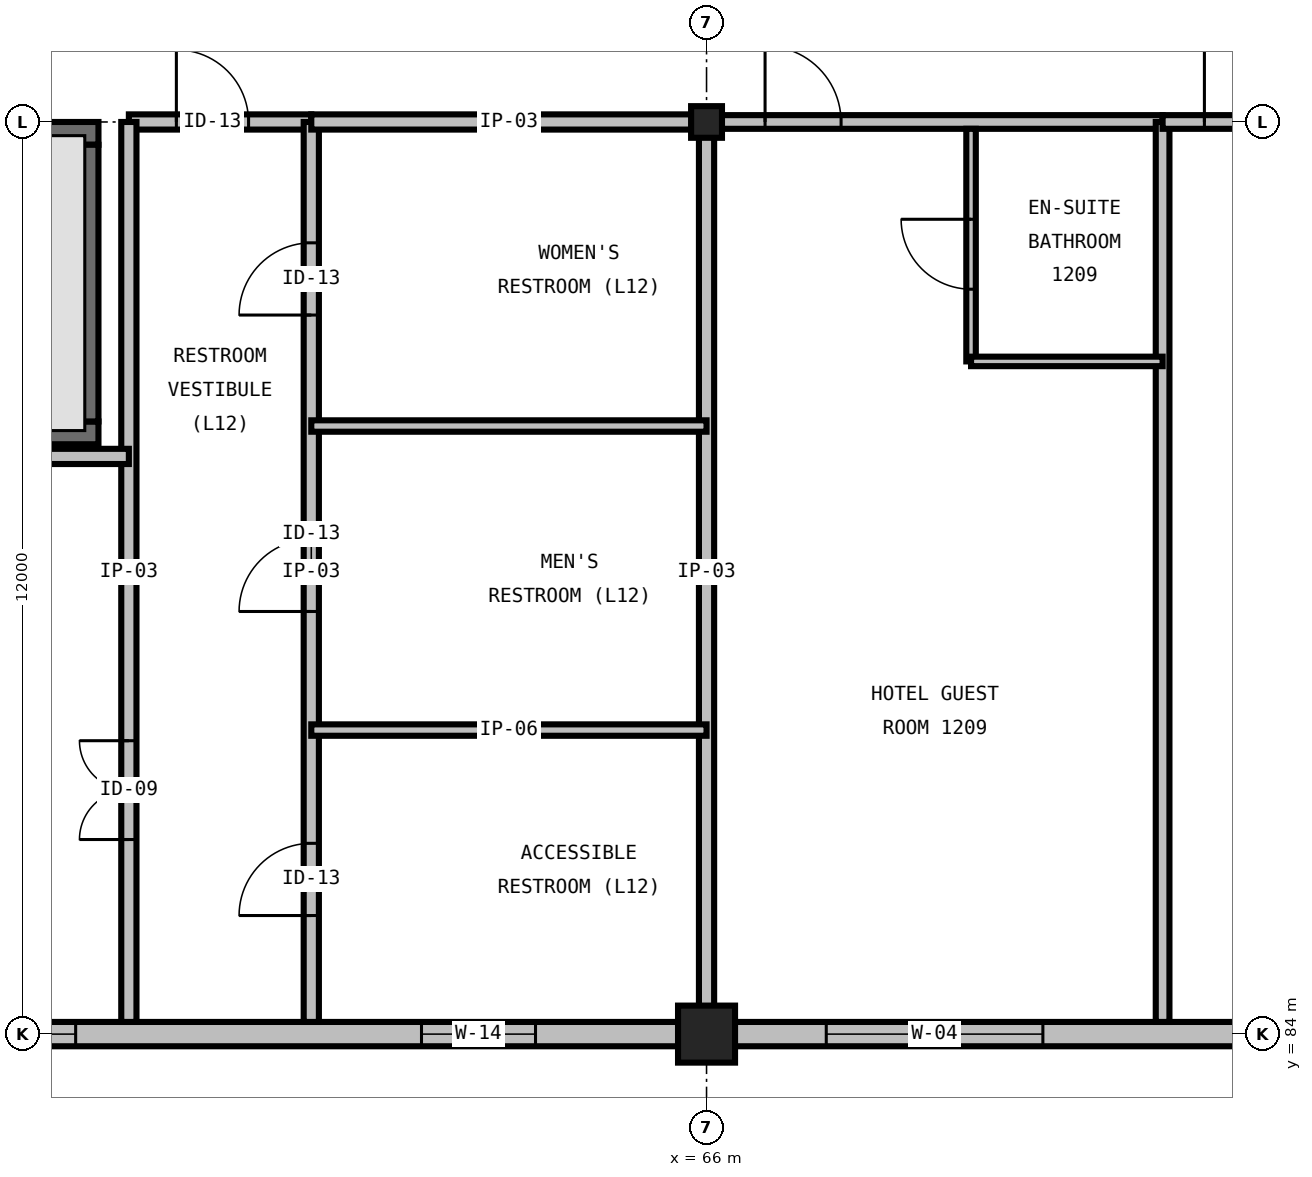
"""IFC4 building model, lengths in metres.
Left out: names, types, materials, properties, quantities, classifications, styles, units other than length and angle.
Written with IfcOpenShell. Run it as: python <this file> out.ifc"""

import sys

from ifc_helpers import new_model, si_unit, direction, frame, frame_2d, origin, origin_2d, place, context, subcontext, project, spatial, rectangle, i_section, extrude, element, fill, save


model = new_model("IFC4")
c1 = context("Model", 3, precision=1e-05, world=origin(), true_north=direction((0.0, 1.0)))
c2 = subcontext(c1, "Body", "Model", "MODEL_VIEW")
j1 = project(units=[si_unit("LENGTHUNIT", "METRE"), si_unit("PLANEANGLEUNIT", "RADIAN")], contexts=[c1])
p1 = place(None, origin())
s1 = spatial("IfcSite", under=j1, at=p1, CompositionType="ELEMENT")
p2 = place(p1, origin())
s2 = spatial("IfcBuilding", under=s1, at=p2, CompositionType="ELEMENT")
p3 = place(p2, frame((0.0, 0.0, 52.8)))
s3 = spatial("IfcBuildingStorey", under=s2, at=p3, CompositionType="ELEMENT", Elevation=52.8)
p4 = place(p3, frame((66.0, 84.0, 0.0), z_axis=(0.0, 0.0, 1.0), x_axis=(1.0, 0.0, 0.0)))
e1 = element("IfcColumn", 1, at=p4, inside=s3, PredefinedType="COLUMN", context=c2, shape_type="SweptSolid", body=[
    extrude(rectangle(XDim=0.75, YDim=0.75, at=origin_2d()), origin(), (0.0, 0.0, 1.0), 3.6),
])
p5 = place(p3, frame((66.0, 96.0, 0.0), z_axis=(0.0, 0.0, 1.0), x_axis=(1.0, 0.0, 0.0)))
e2 = element("IfcColumn", 2, at=p5, inside=s3, PredefinedType="COLUMN", context=c2, shape_type="SweptSolid", body=[
    extrude(i_section(OverallWidth=0.406, OverallDepth=0.416, WebThickness=0.03, FlangeThickness=0.048, FilletRadius=0.031, at=origin_2d()), origin(), (0.0, 0.0, 1.0), 3.6),
])
p6 = place(p3, frame((48.2, 91.91, 0.0), z_axis=(0.0, 0.0, 1.0), x_axis=(1.0, 0.0, 0.0)))
e3 = element("IfcWall", 3, at=p6, inside=s3, PredefinedType="SHEAR", context=c2, shape_type="SweptSolid", body=[
    extrude(rectangle(XDim=9.8, YDim=0.3, at=frame_2d((4.9, 0.0))), origin(), (0.0, 0.0, 1.0), 3.6),
])
p7 = place(p3, frame((58.0, 95.85, 0.0), z_axis=(0.0, 0.0, 1.0), x_axis=(-1.0, 0.0, 0.0)))
e4 = element("IfcWall", 4, at=p7, inside=s3, PredefinedType="SHEAR", context=c2, shape_type="SweptSolid", body=[
    extrude(rectangle(XDim=9.8, YDim=0.3, at=frame_2d((4.9, 0.0))), origin(), (0.0, 0.0, 1.0), 3.6),
])
p8 = place(p7, frame((8.25, 0.0, 0.0)))
e5 = element("IfcOpeningElement", 5, at=p8, cuts=e4, PredefinedType="OPENING", context=c2, shape_type="SweptSolid", body=[
    extrude(rectangle(XDim=1.1, YDim=2.2, at=frame_2d((0.55, 1.1))), frame((0.0, 0.165, 0.0), z_axis=(0.0, -1.0, 0.0), x_axis=(1.0, 0.0, 0.0)), (0.0, 0.0, 1.0), 0.33),
])
p9 = place(p3, frame((57.85, 92.06, 0.0), z_axis=(0.0, 0.0, 1.0), x_axis=(0.0, 1.0, 0.0)))
e6 = element("IfcWall", 6, at=p9, inside=s3, PredefinedType="SHEAR", context=c2, shape_type="SweptSolid", body=[
    extrude(rectangle(XDim=3.64, YDim=0.3, at=frame_2d((1.82, 0.0))), origin(), (0.0, 0.0, 1.0), 3.6),
])
p10 = place(p3, frame((54.0, 84.0, 0.0), z_axis=(0.0, 0.0, 1.0), x_axis=(1.0, 0.0, 0.0)))
e7 = element("IfcWall", 7, at=p10, inside=s3, PredefinedType="STANDARD", context=c2, shape_type="SweptSolid", body=[
    extrude(rectangle(XDim=12.0, YDim=0.32, at=frame_2d((6.0, 0.0))), origin(), (0.0, 0.0, 1.0), 2.536),
])
p11 = place(p10, frame((2.3, 0.0, 1.0)))
e8 = element("IfcOpeningElement", 8, at=p11, cuts=e7, PredefinedType="OPENING", context=c2, shape_type="SweptSolid", body=[
    extrude(rectangle(XDim=1.4, YDim=1.4, at=frame_2d((0.7, 0.7))), frame((0.0, 0.175, 0.0), z_axis=(0.0, -1.0, 0.0), x_axis=(1.0, 0.0, 0.0)), (0.0, 0.0, 1.0), 0.35),
])
p12 = place(p10, frame((8.25, 0.0, 1.0)))
e9 = element("IfcOpeningElement", 9, at=p12, cuts=e7, PredefinedType="OPENING", context=c2, shape_type="SweptSolid", body=[
    extrude(rectangle(XDim=1.5, YDim=1.35, at=frame_2d((0.75, 0.675))), frame((0.0, 0.175, 0.0), z_axis=(0.0, -1.0, 0.0), x_axis=(1.0, 0.0, 0.0)), (0.0, 0.0, 1.0), 0.35),
])
p13 = place(p3, frame((66.0, 84.0, 0.0), z_axis=(0.0, 0.0, 1.0), x_axis=(1.0, 0.0, 0.0)))
e10 = element("IfcWall", 10, at=p13, inside=s3, PredefinedType="STANDARD", context=c2, shape_type="SweptSolid", body=[
    extrude(rectangle(XDim=12.0, YDim=0.32, at=frame_2d((6.0, 0.0))), origin(), (0.0, 0.0, 1.0), 2.536),
])
p14 = place(p13, frame((1.575, 0.0, 0.7)))
e11 = element("IfcOpeningElement", 11, at=p14, cuts=e10, PredefinedType="OPENING", context=c2, shape_type="SweptSolid", body=[
    extrude(rectangle(XDim=2.85, YDim=1.65, at=frame_2d((1.425, 0.825))), frame((0.0, 0.175, 0.0), z_axis=(0.0, -1.0, 0.0), x_axis=(1.0, 0.0, 0.0)), (0.0, 0.0, 1.0), 0.35),
])
p15 = place(p13, frame((7.575, 0.0, 0.7)))
e12 = element("IfcOpeningElement", 12, at=p15, cuts=e10, PredefinedType="OPENING", context=c2, shape_type="SweptSolid", body=[
    extrude(rectangle(XDim=2.85, YDim=1.65, at=frame_2d((1.425, 0.825))), frame((0.0, 0.175, 0.0), z_axis=(0.0, -1.0, 0.0), x_axis=(1.0, 0.0, 0.0)), (0.0, 0.0, 1.0), 0.35),
])
p16 = place(p3, frame((58.4, 96.0, 0.0), z_axis=(0.0, 0.0, 1.0), x_axis=(1.0, 0.0, 0.0)))
e13 = element("IfcWall", 13, at=p16, inside=s3, PredefinedType="PARTITIONING", context=c2, shape_type="SweptSolid", body=[
    extrude(rectangle(XDim=2.4, YDim=0.2, at=frame_2d((1.2, 0.0))), origin(), (0.0, 0.0, 1.0), 2.359),
])
p17 = place(p16, frame((0.625, 0.0, 0.0)))
e14 = element("IfcOpeningElement", 14, at=p17, cuts=e13, PredefinedType="OPENING", context=c2, shape_type="SweptSolid", body=[
    extrude(rectangle(XDim=0.95, YDim=2.15, at=frame_2d((0.475, 1.075))), frame((0.0, 0.115, 0.0), z_axis=(0.0, -1.0, 0.0), x_axis=(1.0, 0.0, 0.0)), (0.0, 0.0, 1.0), 0.23),
])
p18 = place(p3, frame((58.4, 84.16, 0.0), z_axis=(0.0, 0.0, 1.0), x_axis=(0.0, 1.0, 0.0)))
e15 = element("IfcWall", 15, at=p18, inside=s3, PredefinedType="PARTITIONING", context=c2, shape_type="SweptSolid", body=[
    extrude(rectangle(XDim=11.84, YDim=0.2, at=frame_2d((5.92, 0.0))), origin(), (0.0, 0.0, 1.0), 3.29),
])
p19 = place(p18, frame((2.4, 0.0, 0.0)))
e16 = element("IfcOpeningElement", 16, at=p19, cuts=e15, PredefinedType="OPENING", context=c2, shape_type="SweptSolid", body=[
    extrude(rectangle(XDim=1.3, YDim=2.2, at=frame_2d((0.65, 1.1))), frame((0.0, 0.115, 0.0), z_axis=(0.0, -1.0, 0.0), x_axis=(1.0, 0.0, 0.0)), (0.0, 0.0, 1.0), 0.23),
])
p20 = place(p3, frame((60.8, 84.16, 0.0), z_axis=(0.0, 0.0, 1.0), x_axis=(0.0, 1.0, 0.0)))
e17 = element("IfcWall", 17, at=p20, inside=s3, PredefinedType="PARTITIONING", context=c2, shape_type="SweptSolid", body=[
    extrude(rectangle(XDim=11.84, YDim=0.2, at=frame_2d((5.92, 0.0))), origin(), (0.0, 0.0, 1.0), 3.29),
])
p21 = place(p20, frame((1.4, 0.0, 0.0)))
e18 = element("IfcOpeningElement", 18, at=p21, cuts=e17, PredefinedType="OPENING", context=c2, shape_type="SweptSolid", body=[
    extrude(rectangle(XDim=0.95, YDim=2.15, at=frame_2d((0.475, 1.075))), frame((0.0, 0.115, 0.0), z_axis=(0.0, -1.0, 0.0), x_axis=(1.0, 0.0, 0.0)), (0.0, 0.0, 1.0), 0.23),
])
p22 = place(p20, frame((5.4, 0.0, 0.0)))
e19 = element("IfcOpeningElement", 19, at=p22, cuts=e17, PredefinedType="OPENING", context=c2, shape_type="SweptSolid", body=[
    extrude(rectangle(XDim=0.95, YDim=2.15, at=frame_2d((0.475, 1.075))), frame((0.0, 0.115, 0.0), z_axis=(0.0, -1.0, 0.0), x_axis=(1.0, 0.0, 0.0)), (0.0, 0.0, 1.0), 0.23),
])
p23 = place(p20, frame((9.3, 0.0, 0.0)))
e20 = element("IfcOpeningElement", 20, at=p23, cuts=e17, PredefinedType="OPENING", context=c2, shape_type="SweptSolid", body=[
    extrude(rectangle(XDim=0.95, YDim=2.15, at=frame_2d((0.475, 1.075))), frame((0.0, 0.115, 0.0), z_axis=(0.0, -1.0, 0.0), x_axis=(1.0, 0.0, 0.0)), (0.0, 0.0, 1.0), 0.23),
])
p24 = place(p3, frame((66.0, 84.16, 0.0), z_axis=(0.0, 0.0, 1.0), x_axis=(0.0, 1.0, 0.0)))
e21 = element("IfcWall", 21, at=p24, inside=s3, PredefinedType="PARTITIONING", context=c2, shape_type="SweptSolid", body=[
    extrude(rectangle(XDim=11.84, YDim=0.2, at=frame_2d((5.92, 0.0))), origin(), (0.0, 0.0, 1.0), 2.59),
])
p25 = place(p3, frame((60.8, 96.0, 0.0), z_axis=(0.0, 0.0, 1.0), x_axis=(1.0, 0.0, 0.0)))
e22 = element("IfcWall", 22, at=p25, inside=s3, PredefinedType="PARTITIONING", context=c2, shape_type="SweptSolid", body=[
    extrude(rectangle(XDim=5.2, YDim=0.2, at=frame_2d((2.6, 0.0))), origin(), (0.0, 0.0, 1.0), 2.359),
])
for number, where, z_axis, x_axis in (
    (23, (60.8, 88.0, 0.0), (0.0, 0.0, 1.0), (1.0, 0.0, 0.0)),
    (24, (60.8, 92.0, 0.0), (0.0, 0.0, 1.0), (1.0, 0.0, 0.0)),
):
    element("IfcWall", number, at=place(p3, frame(where, z_axis=z_axis, x_axis=x_axis)), inside=s3, PredefinedType="PARTITIONING", context=c2, shape_type="SweptSolid", body=[
        extrude(rectangle(XDim=5.2, YDim=0.15, at=frame_2d((2.6, 0.0))), origin(), (0.0, 0.0, 1.0), 3.29),
    ])
p26 = place(p3, frame((48.0, 91.6, 0.0), z_axis=(0.0, 0.0, 1.0), x_axis=(1.0, 0.0, 0.0)))
e25 = element("IfcWall", 25, at=p26, inside=s3, PredefinedType="PARTITIONING", context=c2, shape_type="SweptSolid", body=[
    extrude(rectangle(XDim=10.4, YDim=0.2, at=frame_2d((5.2, 0.0))), origin(), (0.0, 0.0, 1.0), 3.29),
])
p27 = place(p3, frame((66.0, 96.0, 0.0), z_axis=(0.0, 0.0, 1.0), x_axis=(1.0, 0.0, 0.0)))
e26 = element("IfcWall", 26, at=p27, inside=s3, PredefinedType="PARTITIONING", context=c2, shape_type="SweptSolid", body=[
    extrude(rectangle(XDim=6.0, YDim=0.18, at=frame_2d((3.0, 0.0))), origin(), (0.0, 0.0, 1.0), 2.664),
])
p28 = place(p27, frame((0.77, 0.0, 0.0)))
e27 = element("IfcOpeningElement", 27, at=p28, cuts=e26, PredefinedType="OPENING", context=c2, shape_type="SweptSolid", body=[
    extrude(rectangle(XDim=1.0, YDim=2.15, at=frame_2d((0.5, 1.075))), frame((0.0, 0.105, 0.0), z_axis=(0.0, -1.0, 0.0), x_axis=(1.0, 0.0, 0.0)), (0.0, 0.0, 1.0), 0.21),
])
p29 = place(p3, frame((72.0, 84.16, 0.0), z_axis=(0.0, 0.0, 1.0), x_axis=(0.0, 1.0, 0.0)))
e28 = element("IfcWall", 28, at=p29, inside=s3, PredefinedType="PARTITIONING", context=c2, shape_type="SweptSolid", body=[
    extrude(rectangle(XDim=11.84, YDim=0.18, at=frame_2d((5.92, 0.0))), origin(), (0.0, 0.0, 1.0), 3.29),
])
p30 = place(p3, frame((69.48, 92.85, 0.0), z_axis=(0.0, 0.0, 1.0), x_axis=(0.0, 1.0, 0.0)))
e29 = element("IfcWall", 29, at=p30, inside=s3, PredefinedType="PARTITIONING", context=c2, shape_type="SweptSolid", body=[
    extrude(rectangle(XDim=3.06, YDim=0.125, at=frame_2d((1.53, 0.0))), origin(), (0.0, 0.0, 1.0), 3.29),
])
p31 = place(p30, frame((0.95, 0.0, 0.0)))
e30 = element("IfcOpeningElement", 30, at=p31, cuts=e29, PredefinedType="OPENING", context=c2, shape_type="SweptSolid", body=[
    extrude(rectangle(XDim=0.92, YDim=2.1, at=frame_2d((0.46, 1.05))), frame((0.0, 0.077, 0.0), z_axis=(0.0, -1.0, 0.0), x_axis=(1.0, 0.0, 0.0)), (0.0, 0.0, 1.0), 0.155),
])
p32 = place(p3, frame((69.48, 92.85, 0.0), z_axis=(0.0, 0.0, 1.0), x_axis=(1.0, 0.0, 0.0)))
e31 = element("IfcWall", 31, at=p32, inside=s3, PredefinedType="PARTITIONING", context=c2, shape_type="SweptSolid", body=[
    extrude(rectangle(XDim=2.52, YDim=0.125, at=frame_2d((1.26, 0.0))), origin(), (0.0, 0.0, 1.0), 3.29),
])
p33 = place(p3, frame((72.0, 96.0, 0.0), z_axis=(0.0, 0.0, 1.0), x_axis=(1.0, 0.0, 0.0)))
e32 = element("IfcWall", 32, at=p33, inside=s3, PredefinedType="PARTITIONING", context=c2, shape_type="SweptSolid", body=[
    extrude(rectangle(XDim=11.915, YDim=0.18, at=frame_2d((5.957, 0.0))), origin(), (0.0, 0.0, 1.0), 2.664),
])
p34 = place(p33, frame((0.55, 0.0, 0.0)))
e33 = element("IfcOpeningElement", 33, at=p34, cuts=e32, PredefinedType="OPENING", context=c2, shape_type="SweptSolid", body=[
    extrude(rectangle(XDim=1.1, YDim=2.2, at=frame_2d((0.55, 1.1))), frame((0.0, 0.105, 0.0), z_axis=(0.0, -1.0, 0.0), x_axis=(1.0, 0.0, 0.0)), (0.0, 0.0, 1.0), 0.21),
])
p35 = place(p11, origin())
e34 = element("IfcWindow", 34, at=p35, inside=s3, PartitioningType="SINGLE_PANEL", PredefinedType="WINDOW", context=c2, shape_type="SweptSolid", body=[
    extrude(rectangle(XDim=1.4, YDim=1.4, at=frame_2d((0.7, 0.7))), frame((0.0, 0.03, 0.0), z_axis=(0.0, -1.0, 0.0), x_axis=(1.0, 0.0, 0.0)), (0.0, 0.0, 1.0), 0.06),
])
fill(e8, e34)
p36 = place(p12, origin())
e35 = element("IfcWindow", 35, at=p36, inside=s3, PartitioningType="SINGLE_PANEL", PredefinedType="WINDOW", context=c2, shape_type="SweptSolid", body=[
    extrude(rectangle(XDim=1.5, YDim=1.35, at=frame_2d((0.75, 0.675))), frame((0.0, 0.03, 0.0), z_axis=(0.0, -1.0, 0.0), x_axis=(1.0, 0.0, 0.0)), (0.0, 0.0, 1.0), 0.06),
])
fill(e9, e35)
p37 = place(p14, origin())
e36 = element("IfcWindow", 36, at=p37, inside=s3, PartitioningType="TRIPLE_PANEL_VERTICAL", PredefinedType="WINDOW", context=c2, shape_type="SweptSolid", body=[
    extrude(rectangle(XDim=2.85, YDim=1.65, at=frame_2d((1.425, 0.825))), frame((0.0, 0.03, 0.0), z_axis=(0.0, -1.0, 0.0), x_axis=(1.0, 0.0, 0.0)), (0.0, 0.0, 1.0), 0.06),
])
fill(e11, e36)
p38 = place(p17, origin())
e37 = element("IfcDoor", 37, at=p38, inside=s3, OperationType="SINGLE_SWING_LEFT", PredefinedType="DOOR", context=c2, shape_type="SweptSolid", body=[
    extrude(rectangle(XDim=0.95, YDim=2.15, at=frame_2d((0.475, 1.075))), frame((0.0, 0.025, 0.0), z_axis=(0.0, -1.0, 0.0), x_axis=(1.0, 0.0, 0.0)), (0.0, 0.0, 1.0), 0.05),
])
fill(e14, e37)
p39 = place(p19, origin())
e38 = element("IfcDoor", 38, at=p39, inside=s3, OperationType="DOUBLE_DOOR_SINGLE_SWING", PredefinedType="DOOR", context=c2, shape_type="SweptSolid", body=[
    extrude(rectangle(XDim=1.3, YDim=2.2, at=frame_2d((0.65, 1.1))), frame((0.0, 0.025, 0.0), z_axis=(0.0, -1.0, 0.0), x_axis=(1.0, 0.0, 0.0)), (0.0, 0.0, 1.0), 0.05),
])
fill(e16, e38)
p40 = place(p21, origin())
e39 = element("IfcDoor", 39, at=p40, inside=s3, OperationType="SINGLE_SWING_LEFT", PredefinedType="DOOR", context=c2, shape_type="SweptSolid", body=[
    extrude(rectangle(XDim=0.95, YDim=2.15, at=frame_2d((0.475, 1.075))), frame((0.0, 0.025, 0.0), z_axis=(0.0, -1.0, 0.0), x_axis=(1.0, 0.0, 0.0)), (0.0, 0.0, 1.0), 0.05),
])
fill(e18, e39)
p41 = place(p22, origin())
e40 = element("IfcDoor", 40, at=p41, inside=s3, OperationType="SINGLE_SWING_LEFT", PredefinedType="DOOR", context=c2, shape_type="SweptSolid", body=[
    extrude(rectangle(XDim=0.95, YDim=2.15, at=frame_2d((0.475, 1.075))), frame((0.0, 0.025, 0.0), z_axis=(0.0, -1.0, 0.0), x_axis=(1.0, 0.0, 0.0)), (0.0, 0.0, 1.0), 0.05),
])
fill(e19, e40)
p42 = place(p23, origin())
e41 = element("IfcDoor", 41, at=p42, inside=s3, OperationType="SINGLE_SWING_LEFT", PredefinedType="DOOR", context=c2, shape_type="SweptSolid", body=[
    extrude(rectangle(XDim=0.95, YDim=2.15, at=frame_2d((0.475, 1.075))), frame((0.0, 0.025, 0.0), z_axis=(0.0, -1.0, 0.0), x_axis=(1.0, 0.0, 0.0)), (0.0, 0.0, 1.0), 0.05),
])
fill(e20, e41)
p43 = place(p28, origin())
e42 = element("IfcDoor", 42, at=p43, inside=s3, OperationType="SINGLE_SWING_LEFT", PredefinedType="DOOR", context=c2, shape_type="SweptSolid", body=[
    extrude(rectangle(XDim=1.0, YDim=2.15, at=frame_2d((0.5, 1.075))), frame((0.0, 0.025, 0.0), z_axis=(0.0, -1.0, 0.0), x_axis=(1.0, 0.0, 0.0)), (0.0, 0.0, 1.0), 0.05),
])
fill(e27, e42)
p44 = place(p31, origin())
e43 = element("IfcDoor", 43, at=p44, inside=s3, OperationType="SINGLE_SWING_RIGHT", PredefinedType="DOOR", context=c2, shape_type="SweptSolid", body=[
    extrude(rectangle(XDim=0.92, YDim=2.1, at=frame_2d((0.46, 1.05))), frame((0.0, 0.025, 0.0), z_axis=(0.0, -1.0, 0.0), x_axis=(1.0, 0.0, 0.0)), (0.0, 0.0, 1.0), 0.05),
])
fill(e30, e43)
p45 = place(p34, origin())
e44 = element("IfcDoor", 44, at=p45, inside=s3, OperationType="SINGLE_SWING_LEFT", PredefinedType="DOOR", context=c2, shape_type="SweptSolid", body=[
    extrude(rectangle(XDim=1.1, YDim=2.2, at=frame_2d((0.55, 1.1))), frame((0.0, 0.025, 0.0), z_axis=(0.0, -1.0, 0.0), x_axis=(1.0, 0.0, 0.0)), (0.0, 0.0, 1.0), 0.05),
])
fill(e33, e44)
save(model, sys.argv[1])
